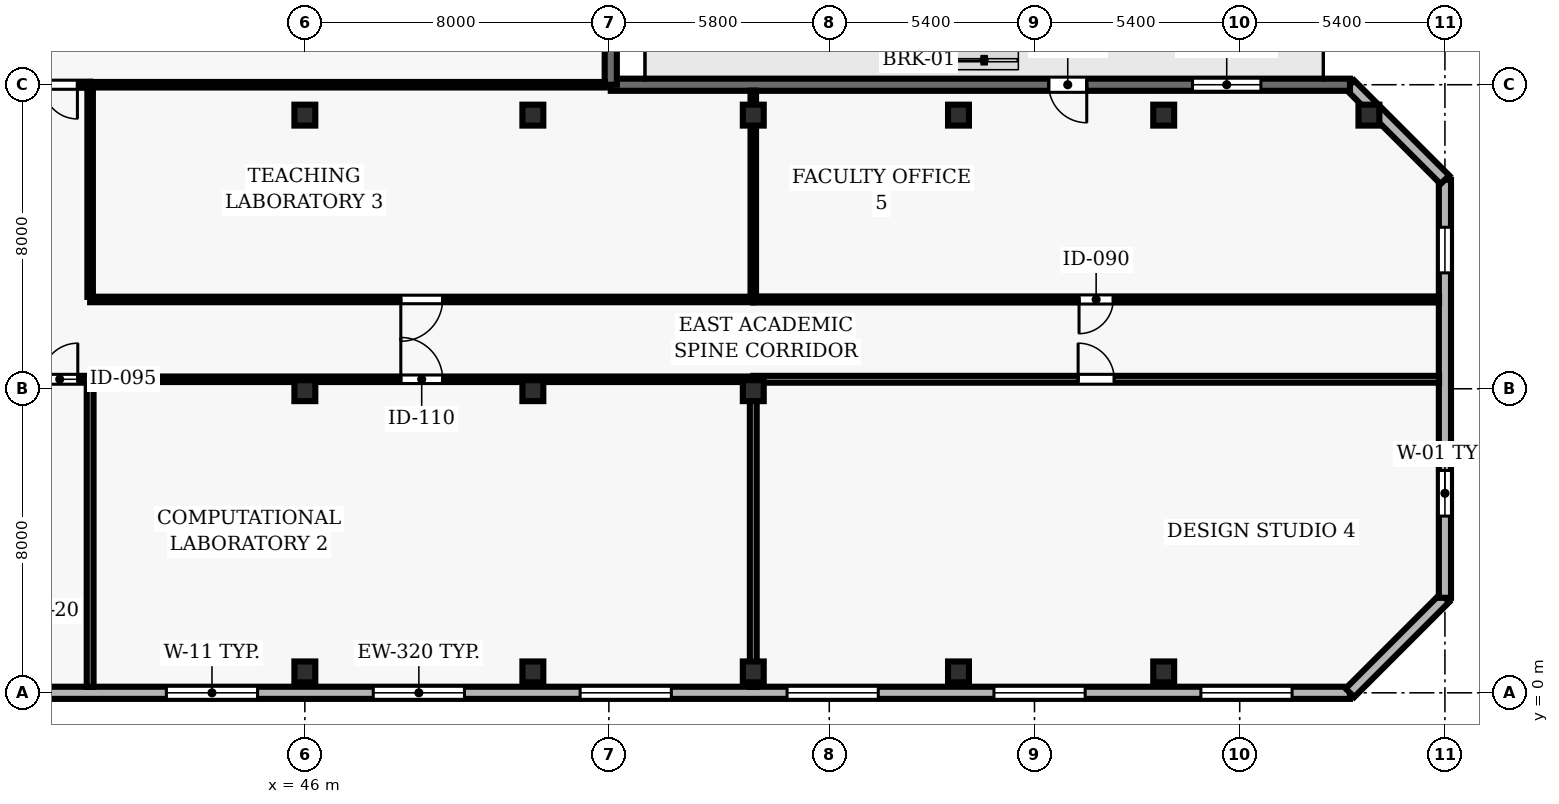
"""IFC4 building model, lengths in metres.
Left out: names, types, materials, properties, quantities, classifications, styles, units other than length and angle.
Written with IfcOpenShell. Run it as: python <this file> out.ifc"""

import sys

from ifc_helpers import new_model, si_unit, direction, frame, frame_2d, origin, origin_2d, place, context, subcontext, project, spatial, rectangle, hollow_rectangle, extrude, element, fill, save


model = new_model("IFC4")
c1 = context("Model", 3, precision=1e-05, world=origin(), true_north=direction((0.0, 1.0)))
c2 = subcontext(c1, "Body", "Model", "MODEL_VIEW")
j1 = project(units=[si_unit("LENGTHUNIT", "METRE"), si_unit("PLANEANGLEUNIT", "RADIAN")], contexts=[c1])
p1 = place(None, origin())
s1 = spatial("IfcSite", under=j1, at=p1, CompositionType="ELEMENT")
p2 = place(p1, origin())
s2 = spatial("IfcBuilding", under=s1, at=p2, CompositionType="ELEMENT")
p3 = place(p2, frame((0.0, 0.0, 46.6)))
s3 = spatial("IfcBuildingStorey", under=s2, at=p3, CompositionType="ELEMENT", Elevation=46.6)
for number, where, z_axis, x_axis in (
    (1, (46.0, 0.55, 0.0), (0.0, 0.0, 1.0), (1.0, 0.0, 0.0)),
    (2, (46.0, 7.95, 0.0), (0.0, 0.0, 1.0), (1.0, 0.0, 0.0)),
    (3, (46.0, 15.2, 0.0), (0.0, 0.0, 1.0), (1.0, 0.0, 0.0)),
    (4, (52.0, 0.55, 0.0), (0.0, 0.0, 1.0), (1.0, 0.0, 0.0)),
    (5, (52.0, 7.95, 0.0), (0.0, 0.0, 1.0), (1.0, 0.0, 0.0)),
    (6, (52.0, 15.2, 0.0), (0.0, 0.0, 1.0), (1.0, 0.0, 0.0)),
    (7, (57.8, 0.55, 0.0), (0.0, 0.0, 1.0), (1.0, 0.0, 0.0)),
    (8, (57.8, 7.95, 0.0), (0.0, 0.0, 1.0), (1.0, 0.0, 0.0)),
    (9, (57.8, 15.2, 0.0), (0.0, 0.0, 1.0), (1.0, 0.0, 0.0)),
    (10, (63.2, 0.55, 0.0), (0.0, 0.0, 1.0), (1.0, 0.0, 0.0)),
    (11, (63.2, 15.2, 0.0), (0.0, 0.0, 1.0), (1.0, 0.0, 0.0)),
    (12, (68.6, 0.55, 0.0), (0.0, 0.0, 1.0), (1.0, 0.0, 0.0)),
    (13, (68.6, 15.2, 0.0), (0.0, 0.0, 1.0), (1.0, 0.0, 0.0)),
    (14, (74.0, 15.2, 0.0), (0.0, 0.0, 1.0), (1.0, 0.0, 0.0)),
):
    element("IfcColumn", number, at=place(p3, frame(where, z_axis=z_axis, x_axis=x_axis)), inside=s3, PredefinedType="COLUMN", context=c2, shape_type="SweptSolid", body=[
        extrude(hollow_rectangle(XDim=0.55, YDim=0.55, WallThickness=0.025, at=origin_2d()), origin(), (0.0, 0.0, 1.0), 3.9),
    ])
p4 = place(p3, frame((24.5, 0.0, 0.0), z_axis=(0.0, 0.0, 1.0), x_axis=(1.0, 0.0, 0.0)))
e15 = element("IfcWall", 15, at=p4, inside=s3, PredefinedType="SOLIDWALL", context=c2, shape_type="SweptSolid", body=[
    extrude(rectangle(XDim=49.0, YDim=0.32, at=frame_2d((24.5, 0.0))), origin(), (0.0, 0.0, 1.0), 3.69),
])
p5 = place(p4, frame((1.522, 0.0, 0.9)))
e16 = element("IfcOpeningElement", 16, at=p5, cuts=e15, PredefinedType="OPENING", context=c2, shape_type="SweptSolid", body=[
    extrude(rectangle(XDim=2.4, YDim=2.2, at=frame_2d((1.2, 1.1))), frame((0.0, 0.17, 0.0), z_axis=(0.0, -1.0, 0.0), x_axis=(1.0, 0.0, 0.0)), (0.0, 0.0, 1.0), 0.34),
])
p6 = place(p4, frame((17.856, 0.0, 0.9)))
e17 = element("IfcOpeningElement", 17, at=p6, cuts=e15, PredefinedType="OPENING", context=c2, shape_type="SweptSolid", body=[
    extrude(rectangle(XDim=2.4, YDim=2.2, at=frame_2d((1.2, 1.1))), frame((0.0, 0.17, 0.0), z_axis=(0.0, -1.0, 0.0), x_axis=(1.0, 0.0, 0.0)), (0.0, 0.0, 1.0), 0.34),
])
p7 = place(p4, frame((23.3, 0.0, 0.9)))
e18 = element("IfcOpeningElement", 18, at=p7, cuts=e15, PredefinedType="OPENING", context=c2, shape_type="SweptSolid", body=[
    extrude(rectangle(XDim=2.4, YDim=2.2, at=frame_2d((1.2, 1.1))), frame((0.0, 0.17, 0.0), z_axis=(0.0, -1.0, 0.0), x_axis=(1.0, 0.0, 0.0)), (0.0, 0.0, 1.0), 0.34),
])
p8 = place(p4, frame((28.744, 0.0, 0.9)))
e19 = element("IfcOpeningElement", 19, at=p8, cuts=e15, PredefinedType="OPENING", context=c2, shape_type="SweptSolid", body=[
    extrude(rectangle(XDim=2.4, YDim=2.2, at=frame_2d((1.2, 1.1))), frame((0.0, 0.17, 0.0), z_axis=(0.0, -1.0, 0.0), x_axis=(1.0, 0.0, 0.0)), (0.0, 0.0, 1.0), 0.34),
])
p9 = place(p4, frame((34.189, 0.0, 0.9)))
e20 = element("IfcOpeningElement", 20, at=p9, cuts=e15, PredefinedType="OPENING", context=c2, shape_type="SweptSolid", body=[
    extrude(rectangle(XDim=2.4, YDim=2.2, at=frame_2d((1.2, 1.1))), frame((0.0, 0.17, 0.0), z_axis=(0.0, -1.0, 0.0), x_axis=(1.0, 0.0, 0.0)), (0.0, 0.0, 1.0), 0.34),
])
p10 = place(p4, frame((39.633, 0.0, 0.9)))
e21 = element("IfcOpeningElement", 21, at=p10, cuts=e15, PredefinedType="OPENING", context=c2, shape_type="SweptSolid", body=[
    extrude(rectangle(XDim=2.4, YDim=2.2, at=frame_2d((1.2, 1.1))), frame((0.0, 0.17, 0.0), z_axis=(0.0, -1.0, 0.0), x_axis=(1.0, 0.0, 0.0)), (0.0, 0.0, 1.0), 0.34),
])
p11 = place(p4, frame((45.078, 0.0, 0.9)))
e22 = element("IfcOpeningElement", 22, at=p11, cuts=e15, PredefinedType="OPENING", context=c2, shape_type="SweptSolid", body=[
    extrude(rectangle(XDim=2.4, YDim=2.2, at=frame_2d((1.2, 1.1))), frame((0.0, 0.17, 0.0), z_axis=(0.0, -1.0, 0.0), x_axis=(1.0, 0.0, 0.0)), (0.0, 0.0, 1.0), 0.34),
])
p12 = place(p3, frame((73.5, 0.0, 0.0), z_axis=(0.0, 0.0, 1.0), x_axis=(0.707106781187, 0.707106781187, 0.0)))
e23 = element("IfcWall", 23, at=p12, inside=s3, PredefinedType="SOLIDWALL", context=c2, shape_type="SweptSolid", body=[
    extrude(rectangle(XDim=3.536, YDim=0.32, at=frame_2d((1.768, 0.0))), origin(), (0.0, 0.0, 1.0), 3.69),
])
p13 = place(p3, frame((76.0, 2.5, 0.0), z_axis=(0.0, 0.0, 1.0), x_axis=(0.0, 1.0, 0.0)))
e24 = element("IfcWall", 24, at=p13, inside=s3, PredefinedType="SOLIDWALL", context=c2, shape_type="SweptSolid", body=[
    extrude(rectangle(XDim=11.0, YDim=0.32, at=frame_2d((5.5, 0.0))), origin(), (0.0, 0.0, 1.0), 3.69),
])
p14 = place(p13, frame((2.15, 0.0, 0.9)))
e25 = element("IfcOpeningElement", 25, at=p14, cuts=e24, PredefinedType="OPENING", context=c2, shape_type="SweptSolid", body=[
    extrude(rectangle(XDim=1.2, YDim=1.6, at=frame_2d((0.6, 0.8))), frame((0.0, 0.17, 0.0), z_axis=(0.0, -1.0, 0.0), x_axis=(1.0, 0.0, 0.0)), (0.0, 0.0, 1.0), 0.34),
])
p15 = place(p13, frame((8.55, 0.0, 0.9)))
e26 = element("IfcOpeningElement", 26, at=p15, cuts=e24, PredefinedType="OPENING", context=c2, shape_type="SweptSolid", body=[
    extrude(rectangle(XDim=1.2, YDim=1.6, at=frame_2d((0.6, 0.8))), frame((0.0, 0.17, 0.0), z_axis=(0.0, -1.0, 0.0), x_axis=(1.0, 0.0, 0.0)), (0.0, 0.0, 1.0), 0.34),
])
p16 = place(p3, frame((76.0, 13.5, 0.0), z_axis=(0.0, 0.0, 1.0), x_axis=(-0.707106781187, 0.707106781187, 0.0)))
e27 = element("IfcWall", 27, at=p16, inside=s3, PredefinedType="SOLIDWALL", context=c2, shape_type="SweptSolid", body=[
    extrude(rectangle(XDim=3.536, YDim=0.32, at=frame_2d((1.768, 0.0))), origin(), (0.0, 0.0, 1.0), 3.69),
])
p17 = place(p3, frame((73.5, 16.0, 0.0), z_axis=(0.0, 0.0, 1.0), x_axis=(-1.0, 0.0, 0.0)))
e28 = element("IfcWall", 28, at=p17, inside=s3, PredefinedType="SOLIDWALL", context=c2, shape_type="SweptSolid", body=[
    extrude(rectangle(XDim=19.45, YDim=0.32, at=frame_2d((9.725, 0.0))), origin(), (0.0, 0.0, 1.0), 3.69),
])
p18 = place(p17, frame((6.925, 0.0, 0.0)))
e29 = element("IfcOpeningElement", 29, at=p18, cuts=e28, PredefinedType="OPENING", context=c2, shape_type="SweptSolid", body=[
    extrude(rectangle(XDim=1.0, YDim=2.2, at=frame_2d((0.5, 1.1))), frame((0.0, 0.17, 0.0), z_axis=(0.0, -1.0, 0.0), x_axis=(1.0, 0.0, 0.0)), (0.0, 0.0, 1.0), 0.34),
])
p19 = place(p17, frame((2.342, 0.0, 0.9)))
e30 = element("IfcOpeningElement", 30, at=p19, cuts=e28, PredefinedType="OPENING", context=c2, shape_type="SweptSolid", body=[
    extrude(rectangle(XDim=1.8, YDim=1.6, at=frame_2d((0.9, 0.8))), frame((0.0, 0.17, 0.0), z_axis=(0.0, -1.0, 0.0), x_axis=(1.0, 0.0, 0.0)), (0.0, 0.0, 1.0), 0.34),
])
p20 = place(p3, frame((54.05, 16.0, 0.0), z_axis=(0.0, 0.0, 1.0), x_axis=(0.0, 1.0, 0.0)))
e31 = element("IfcWall", 31, at=p20, inside=s3, PredefinedType="SOLIDWALL", context=c2, shape_type="SweptSolid", body=[
    extrude(rectangle(XDim=10.747, YDim=0.32, at=frame_2d((5.374, 0.0))), origin(), (0.0, 0.0, 1.0), 3.69),
])
p21 = place(p20, frame((4.324, 0.0, 0.9)))
e32 = element("IfcOpeningElement", 32, at=p21, cuts=e31, PredefinedType="OPENING", context=c2, shape_type="SweptSolid", body=[
    extrude(rectangle(XDim=2.1, YDim=1.6, at=frame_2d((1.05, 0.8))), frame((0.0, 0.17, 0.0), z_axis=(0.0, -1.0, 0.0), x_axis=(1.0, 0.0, 0.0)), (0.0, 0.0, 1.0), 0.34),
])
p22 = place(p3, frame((38.05, 8.25, 0.0), z_axis=(0.0, 0.0, 1.0), x_axis=(1.0, 0.0, 0.0)))
e33 = element("IfcWall", 33, at=p22, inside=s3, PredefinedType="PARTITIONING", context=c2, shape_type="SweptSolid", body=[
    extrude(rectangle(XDim=2.3, YDim=0.18, at=frame_2d((1.15, 0.0))), origin(), (0.0, 0.0, 1.0), 2.995),
])
p23 = place(p22, frame((1.025, 0.0, 0.0)))
e34 = element("IfcOpeningElement", 34, at=p23, cuts=e33, PredefinedType="OPENING", context=c2, shape_type="SweptSolid", body=[
    extrude(rectangle(XDim=0.95, YDim=2.1, at=frame_2d((0.475, 1.05))), frame((0.0, 0.1, 0.0), z_axis=(0.0, -1.0, 0.0), x_axis=(1.0, 0.0, 0.0)), (0.0, 0.0, 1.0), 0.2),
])
p24 = place(p3, frame((40.35, 8.25, 0.0), z_axis=(0.0, 0.0, 1.0), x_axis=(1.0, 0.0, 0.0)))
e35 = element("IfcWall", 35, at=p24, inside=s3, PredefinedType="PARTITIONING", context=c2, shape_type="SweptSolid", body=[
    extrude(rectangle(XDim=17.45, YDim=0.145, at=frame_2d((8.725, 0.0))), origin(), (0.0, 0.0, 1.0), 2.995),
])
p25 = place(p24, frame((8.175, 0.0, 0.0)))
e36 = element("IfcOpeningElement", 36, at=p25, cuts=e35, PredefinedType="OPENING", context=c2, shape_type="SweptSolid", body=[
    extrude(rectangle(XDim=1.1, YDim=2.15, at=frame_2d((0.55, 1.075))), frame((0.0, 0.083, 0.0), z_axis=(0.0, -1.0, 0.0), x_axis=(1.0, 0.0, 0.0)), (0.0, 0.0, 1.0), 0.165),
])
p26 = place(p3, frame((40.35, 16.0, 0.0), z_axis=(0.0, 0.0, 1.0), x_axis=(1.0, 0.0, 0.0)))
e37 = element("IfcWall", 37, at=p26, inside=s3, PredefinedType="PARTITIONING", context=c2, shape_type="SweptSolid", body=[
    extrude(rectangle(XDim=13.545, YDim=0.145, at=frame_2d((6.772, 0.0))), origin(), (0.0, 0.0, 1.0), 3.39),
])
p27 = place(p3, frame((40.35, 16.0, 0.0), z_axis=(0.0, 0.0, 1.0), x_axis=(-1.0, 0.0, 0.0)))
e38 = element("IfcWall", 38, at=p27, inside=s3, PredefinedType="PARTITIONING", context=c2, shape_type="SweptSolid", body=[
    extrude(rectangle(XDim=2.27, YDim=0.16, at=frame_2d((1.135, 0.0))), origin(), (0.0, 0.0, 1.0), 3.69),
])
p28 = place(p27, frame((0.335, 0.0, 0.0)))
e39 = element("IfcOpeningElement", 39, at=p28, cuts=e38, PredefinedType="OPENING", context=c2, shape_type="SweptSolid", body=[
    extrude(rectangle(XDim=0.9, YDim=2.1, at=frame_2d((0.45, 1.05))), frame((0.0, 0.09, 0.0), z_axis=(0.0, -1.0, 0.0), x_axis=(1.0, 0.0, 0.0)), (0.0, 0.0, 1.0), 0.18),
])
p29 = place(p3, frame((57.8, 8.25, 0.0), z_axis=(0.0, 0.0, 1.0), x_axis=(1.0, 0.0, 0.0)))
e40 = element("IfcWall", 40, at=p29, inside=s3, PredefinedType="PARTITIONING", context=c2, shape_type="SweptSolid", body=[
    extrude(rectangle(XDim=18.045, YDim=0.18, at=frame_2d((9.022, 0.0))), origin(), (0.0, 0.0, 1.0), 3.69),
])
p30 = place(p29, frame((8.548, 0.0, 0.0)))
e41 = element("IfcOpeningElement", 41, at=p30, cuts=e40, PredefinedType="OPENING", context=c2, shape_type="SweptSolid", body=[
    extrude(rectangle(XDim=0.95, YDim=2.1, at=frame_2d((0.475, 1.05))), frame((0.0, 0.1, 0.0), z_axis=(0.0, -1.0, 0.0), x_axis=(1.0, 0.0, 0.0)), (0.0, 0.0, 1.0), 0.2),
])
p31 = place(p3, frame((57.8, 10.35, 0.0), z_axis=(0.0, 0.0, 1.0), x_axis=(-1.0, 0.0, 0.0)))
e42 = element("IfcWall", 42, at=p31, inside=s3, PredefinedType="PARTITIONING", context=c2, shape_type="SweptSolid", body=[
    extrude(rectangle(XDim=17.45, YDim=0.145, at=frame_2d((8.725, 0.0))), origin(), (0.0, 0.0, 1.0), 3.227),
])
p32 = place(p31, frame((8.175, 0.0, 0.0)))
e43 = element("IfcOpeningElement", 43, at=p32, cuts=e42, PredefinedType="OPENING", context=c2, shape_type="SweptSolid", body=[
    extrude(rectangle(XDim=1.1, YDim=2.15, at=frame_2d((0.55, 1.075))), frame((0.0, 0.083, 0.0), z_axis=(0.0, -1.0, 0.0), x_axis=(1.0, 0.0, 0.0)), (0.0, 0.0, 1.0), 0.165),
])
p33 = place(p3, frame((75.845, 10.35, 0.0), z_axis=(0.0, 0.0, 1.0), x_axis=(-1.0, 0.0, 0.0)))
e44 = element("IfcWall", 44, at=p33, inside=s3, PredefinedType="PARTITIONING", context=c2, shape_type="SweptSolid", body=[
    extrude(rectangle(XDim=18.045, YDim=0.16, at=frame_2d((9.022, 0.0))), origin(), (0.0, 0.0, 1.0), 3.227),
])
p34 = place(p33, frame((8.573, 0.0, 0.0)))
e45 = element("IfcOpeningElement", 45, at=p34, cuts=e44, PredefinedType="OPENING", context=c2, shape_type="SweptSolid", body=[
    extrude(rectangle(XDim=0.9, YDim=2.1, at=frame_2d((0.45, 1.05))), frame((0.0, 0.09, 0.0), z_axis=(0.0, -1.0, 0.0), x_axis=(1.0, 0.0, 0.0)), (0.0, 0.0, 1.0), 0.18),
])
p35 = place(p3, frame((40.35, 0.155, 0.0), z_axis=(0.0, 0.0, 1.0), x_axis=(0.0, 1.0, 0.0)))
e46 = element("IfcWall", 46, at=p35, inside=s3, PredefinedType="PARTITIONING", context=c2, shape_type="SweptSolid", body=[
    extrude(rectangle(XDim=8.01, YDim=0.18, at=frame_2d((4.005, 0.0))), origin(), (0.0, 0.0, 1.0), 3.69),
])
p36 = place(p3, frame((40.35, 10.418, 0.0), z_axis=(0.0, 0.0, 1.0), x_axis=(0.0, 1.0, 0.0)))
e47 = element("IfcWall", 47, at=p36, inside=s3, PredefinedType="PARTITIONING", context=c2, shape_type="SweptSolid", body=[
    extrude(rectangle(XDim=5.507, YDim=0.145, at=frame_2d((2.753, 0.0))), origin(), (0.0, 0.0, 1.0), 3.227),
])
p37 = place(p3, frame((57.8, 0.155, 0.0), z_axis=(0.0, 0.0, 1.0), x_axis=(0.0, 1.0, 0.0)))
e48 = element("IfcWall", 48, at=p37, inside=s3, PredefinedType="PARTITIONING", context=c2, shape_type="SweptSolid", body=[
    extrude(rectangle(XDim=8.01, YDim=0.18, at=frame_2d((4.005, 0.0))), origin(), (0.0, 0.0, 1.0), 2.995),
])
p38 = place(p3, frame((57.8, 10.425, 0.0), z_axis=(0.0, 0.0, 1.0), x_axis=(0.0, 1.0, 0.0)))
e49 = element("IfcWall", 49, at=p38, inside=s3, PredefinedType="PARTITIONING", context=c2, shape_type="SweptSolid", body=[
    extrude(rectangle(XDim=5.42, YDim=0.145, at=frame_2d((2.71, 0.0))), origin(), (0.0, 0.0, 1.0), 2.995),
])
p39 = place(p6, origin())
e50 = element("IfcWindow", 50, at=p39, inside=s3, PartitioningType="SINGLE_PANEL", PredefinedType="WINDOW", context=c2, shape_type="SweptSolid", body=[
    extrude(rectangle(XDim=2.4, YDim=2.2, at=frame_2d((1.2, 1.1))), frame((0.0, 0.03, 0.0), z_axis=(0.0, -1.0, 0.0), x_axis=(1.0, 0.0, 0.0)), (0.0, 0.0, 1.0), 0.06),
])
fill(e17, e50)
p40 = place(p7, origin())
e51 = element("IfcWindow", 51, at=p40, inside=s3, PartitioningType="SINGLE_PANEL", PredefinedType="WINDOW", context=c2, shape_type="SweptSolid", body=[
    extrude(rectangle(XDim=2.4, YDim=2.2, at=frame_2d((1.2, 1.1))), frame((0.0, 0.03, 0.0), z_axis=(0.0, -1.0, 0.0), x_axis=(1.0, 0.0, 0.0)), (0.0, 0.0, 1.0), 0.06),
])
fill(e18, e51)
p41 = place(p8, origin())
e52 = element("IfcWindow", 52, at=p41, inside=s3, PartitioningType="SINGLE_PANEL", PredefinedType="WINDOW", context=c2, shape_type="SweptSolid", body=[
    extrude(rectangle(XDim=2.4, YDim=2.2, at=frame_2d((1.2, 1.1))), frame((0.0, 0.03, 0.0), z_axis=(0.0, -1.0, 0.0), x_axis=(1.0, 0.0, 0.0)), (0.0, 0.0, 1.0), 0.06),
])
fill(e19, e52)
p42 = place(p9, origin())
e53 = element("IfcWindow", 53, at=p42, inside=s3, PartitioningType="SINGLE_PANEL", PredefinedType="WINDOW", context=c2, shape_type="SweptSolid", body=[
    extrude(rectangle(XDim=2.4, YDim=2.2, at=frame_2d((1.2, 1.1))), frame((0.0, 0.03, 0.0), z_axis=(0.0, -1.0, 0.0), x_axis=(1.0, 0.0, 0.0)), (0.0, 0.0, 1.0), 0.06),
])
fill(e20, e53)
p43 = place(p10, origin())
e54 = element("IfcWindow", 54, at=p43, inside=s3, PartitioningType="SINGLE_PANEL", PredefinedType="WINDOW", context=c2, shape_type="SweptSolid", body=[
    extrude(rectangle(XDim=2.4, YDim=2.2, at=frame_2d((1.2, 1.1))), frame((0.0, 0.03, 0.0), z_axis=(0.0, -1.0, 0.0), x_axis=(1.0, 0.0, 0.0)), (0.0, 0.0, 1.0), 0.06),
])
fill(e21, e54)
p44 = place(p11, origin())
e55 = element("IfcWindow", 55, at=p44, inside=s3, PartitioningType="SINGLE_PANEL", PredefinedType="WINDOW", context=c2, shape_type="SweptSolid", body=[
    extrude(rectangle(XDim=2.4, YDim=2.2, at=frame_2d((1.2, 1.1))), frame((0.0, 0.03, 0.0), z_axis=(0.0, -1.0, 0.0), x_axis=(1.0, 0.0, 0.0)), (0.0, 0.0, 1.0), 0.06),
])
fill(e22, e55)
p45 = place(p14, origin())
e56 = element("IfcWindow", 56, at=p45, inside=s3, PartitioningType="SINGLE_PANEL", PredefinedType="WINDOW", context=c2, shape_type="SweptSolid", body=[
    extrude(rectangle(XDim=1.2, YDim=1.6, at=frame_2d((0.6, 0.8))), frame((0.0, 0.03, 0.0), z_axis=(0.0, -1.0, 0.0), x_axis=(1.0, 0.0, 0.0)), (0.0, 0.0, 1.0), 0.06),
])
fill(e25, e56)
p46 = place(p15, origin())
e57 = element("IfcWindow", 57, at=p46, inside=s3, PartitioningType="SINGLE_PANEL", PredefinedType="WINDOW", context=c2, shape_type="SweptSolid", body=[
    extrude(rectangle(XDim=1.2, YDim=1.6, at=frame_2d((0.6, 0.8))), frame((0.0, 0.03, 0.0), z_axis=(0.0, -1.0, 0.0), x_axis=(1.0, 0.0, 0.0)), (0.0, 0.0, 1.0), 0.06),
])
fill(e26, e57)
p47 = place(p18, origin())
e58 = element("IfcDoor", 58, at=p47, inside=s3, OperationType="SINGLE_SWING_LEFT", PredefinedType="DOOR", context=c2, shape_type="SweptSolid", body=[
    extrude(rectangle(XDim=1.0, YDim=2.2, at=frame_2d((0.5, 1.1))), frame((0.0, 0.025, 0.0), z_axis=(0.0, -1.0, 0.0), x_axis=(1.0, 0.0, 0.0)), (0.0, 0.0, 1.0), 0.05),
])
fill(e29, e58)
p48 = place(p19, origin())
e59 = element("IfcWindow", 59, at=p48, inside=s3, PartitioningType="SINGLE_PANEL", PredefinedType="WINDOW", context=c2, shape_type="SweptSolid", body=[
    extrude(rectangle(XDim=1.8, YDim=1.6, at=frame_2d((0.9, 0.8))), frame((0.0, 0.03, 0.0), z_axis=(0.0, -1.0, 0.0), x_axis=(1.0, 0.0, 0.0)), (0.0, 0.0, 1.0), 0.06),
])
fill(e30, e59)
p49 = place(p23, origin())
e60 = element("IfcDoor", 60, at=p49, inside=s3, OperationType="SINGLE_SWING_RIGHT", PredefinedType="DOOR", context=c2, shape_type="SweptSolid", body=[
    extrude(rectangle(XDim=0.95, YDim=2.1, at=frame_2d((0.475, 1.05))), frame((0.0, 0.025, 0.0), z_axis=(0.0, -1.0, 0.0), x_axis=(1.0, 0.0, 0.0)), (0.0, 0.0, 1.0), 0.05),
])
fill(e34, e60)
p50 = place(p25, origin())
e61 = element("IfcDoor", 61, at=p50, inside=s3, OperationType="SINGLE_SWING_LEFT", PredefinedType="DOOR", context=c2, shape_type="SweptSolid", body=[
    extrude(rectangle(XDim=1.1, YDim=2.15, at=frame_2d((0.55, 1.075))), frame((0.0, 0.025, 0.0), z_axis=(0.0, -1.0, 0.0), x_axis=(1.0, 0.0, 0.0)), (0.0, 0.0, 1.0), 0.05),
])
fill(e36, e61)
p51 = place(p32, origin())
e62 = element("IfcDoor", 62, at=p51, inside=s3, OperationType="SINGLE_SWING_RIGHT", PredefinedType="DOOR", context=c2, shape_type="SweptSolid", body=[
    extrude(rectangle(XDim=1.1, YDim=2.15, at=frame_2d((0.55, 1.075))), frame((0.0, 0.025, 0.0), z_axis=(0.0, -1.0, 0.0), x_axis=(1.0, 0.0, 0.0)), (0.0, 0.0, 1.0), 0.05),
])
fill(e43, e62)
p52 = place(p30, origin())
e63 = element("IfcDoor", 63, at=p52, inside=s3, OperationType="SINGLE_SWING_LEFT", PredefinedType="DOOR", context=c2, shape_type="SweptSolid", body=[
    extrude(rectangle(XDim=0.95, YDim=2.1, at=frame_2d((0.475, 1.05))), frame((0.0, 0.025, 0.0), z_axis=(0.0, -1.0, 0.0), x_axis=(1.0, 0.0, 0.0)), (0.0, 0.0, 1.0), 0.05),
])
fill(e41, e63)
p53 = place(p34, origin())
e64 = element("IfcDoor", 64, at=p53, inside=s3, OperationType="SINGLE_SWING_RIGHT", PredefinedType="DOOR", context=c2, shape_type="SweptSolid", body=[
    extrude(rectangle(XDim=0.9, YDim=2.1, at=frame_2d((0.45, 1.05))), frame((0.0, 0.025, 0.0), z_axis=(0.0, -1.0, 0.0), x_axis=(1.0, 0.0, 0.0)), (0.0, 0.0, 1.0), 0.05),
])
fill(e45, e64)
p54 = place(p28, origin())
e65 = element("IfcDoor", 65, at=p54, inside=s3, OperationType="SINGLE_SWING_LEFT", PredefinedType="DOOR", context=c2, shape_type="SweptSolid", body=[
    extrude(rectangle(XDim=0.9, YDim=2.1, at=frame_2d((0.45, 1.05))), frame((0.0, 0.025, 0.0), z_axis=(0.0, -1.0, 0.0), x_axis=(1.0, 0.0, 0.0)), (0.0, 0.0, 1.0), 0.05),
])
fill(e39, e65)
save(model, sys.argv[1])
